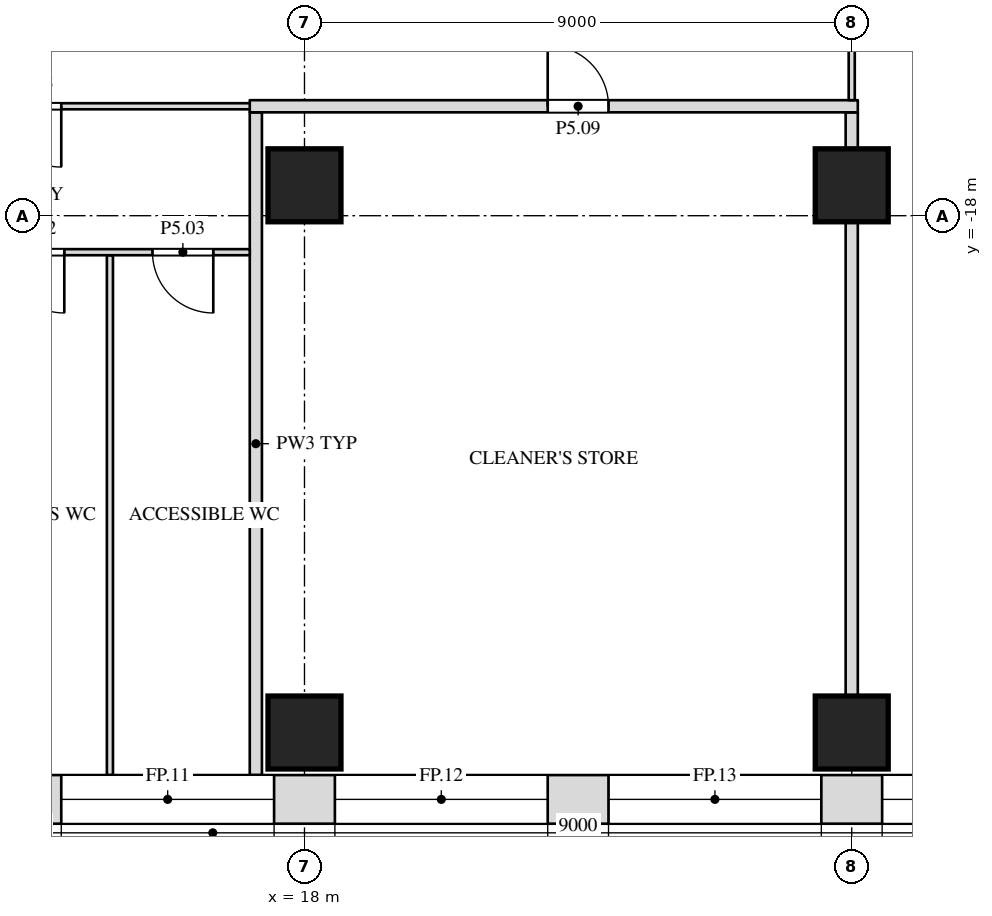
"""IFC4 building model, lengths in metres.
Left out: names, types, materials, properties, quantities, classifications, styles, units other than length and angle.
Written with IfcOpenShell. Run it as: python <this file> out.ifc"""

import sys

from ifc_helpers import new_model, si_unit, direction, frame, frame_2d, origin, origin_2d, place, context, subcontext, project, spatial, rectangle, extrude, element, fill, save


model = new_model("IFC4")
c1 = context("Model", 3, precision=1e-05, world=origin(), true_north=direction((0.0, 1.0)))
c2 = subcontext(c1, "Body", "Model", "MODEL_VIEW")
j1 = project(units=[si_unit("LENGTHUNIT", "METRE"), si_unit("PLANEANGLEUNIT", "RADIAN")], contexts=[c1])
p1 = place(None, origin())
s1 = spatial("IfcSite", under=j1, at=p1, CompositionType="ELEMENT")
p2 = place(p1, origin())
s2 = spatial("IfcBuilding", under=s1, at=p2, CompositionType="ELEMENT")
p3 = place(p2, frame((0.0, 0.0, 33.0)))
s3 = spatial("IfcBuildingStorey", under=s2, at=p3, CompositionType="ELEMENT", Elevation=33.0)
for number, where, z_axis, x_axis in (
    (1, (18.0, -26.5, 0.0), (0.0, 0.0, 1.0), (1.0, 0.0, 0.0)),
    (2, (27.0, -26.5, 0.0), (0.0, 0.0, 1.0), (1.0, 0.0, 0.0)),
    (3, (18.0, -17.5, 0.0), (0.0, 0.0, 1.0), (1.0, 0.0, 0.0)),
    (4, (27.0, -17.5, 0.0), (0.0, 0.0, 1.0), (1.0, 0.0, 0.0)),
):
    element("IfcColumn", number, at=place(p3, frame(where, z_axis=z_axis, x_axis=x_axis)), inside=s3, PredefinedType="COLUMN", context=c2, shape_type="SweptSolid", body=[
        extrude(rectangle(XDim=1.2, YDim=1.2, at=origin_2d()), origin(), (0.0, 0.0, 1.0), 6.0),
    ])
p4 = place(p3, frame((14.8, -27.2, 0.0), z_axis=(0.0, 0.0, 1.0), x_axis=(0.0, 1.0, 0.0)))
e5 = element("IfcWall", 5, at=p4, inside=s3, PredefinedType="PARTITIONING", context=c2, shape_type="SweptSolid", body=[
    extrude(rectangle(XDim=8.55, YDim=0.1, at=frame_2d((4.275, 0.0))), origin(), (0.0, 0.0, 1.0), 5.75),
])
p5 = place(p3, frame((17.2, -27.2, 0.0), z_axis=(0.0, 0.0, 1.0), x_axis=(0.0, 1.0, 0.0)))
e6 = element("IfcWall", 6, at=p5, inside=s3, PredefinedType="PARTITIONING", context=c2, shape_type="SweptSolid", body=[
    extrude(rectangle(XDim=10.9, YDim=0.2, at=frame_2d((5.45, 0.0))), origin(), (0.0, 0.0, 1.0), 5.75),
])
p6 = place(p3, frame((27.0, -25.9, 0.0), z_axis=(0.0, 0.0, 1.0), x_axis=(0.0, 1.0, 0.0)))
e7 = element("IfcWall", 7, at=p6, inside=s3, PredefinedType="PARTITIONING", context=c2, shape_type="SweptSolid", body=[
    extrude(rectangle(XDim=7.8, YDim=0.2, at=frame_2d((3.9, 0.0))), origin(), (0.0, 0.0, 1.0), 5.138),
])
p7 = place(p3, frame((27.0, -16.9, 0.0), z_axis=(0.0, 0.0, 1.0), x_axis=(0.0, 1.0, 0.0)))
e8 = element("IfcWall", 8, at=p7, inside=s3, PredefinedType="PARTITIONING", context=c2, shape_type="SweptSolid", body=[
    extrude(rectangle(XDim=0.6, YDim=0.2, at=frame_2d((0.3, 0.0))), origin(), (0.0, 0.0, 1.0), 5.138),
])
p8 = place(p3, frame((9.85, -18.6, 0.0), z_axis=(0.0, 0.0, 1.0), x_axis=(1.0, 0.0, 0.0)))
e9 = element("IfcWall", 9, at=p8, inside=s3, PredefinedType="PARTITIONING", context=c2, shape_type="SweptSolid", body=[
    extrude(rectangle(XDim=7.25, YDim=0.1, at=frame_2d((3.625, 0.0))), origin(), (0.0, 0.0, 1.0), 5.75),
])
p9 = place(p8, frame((0.7, 0.0, 0.0)))
e10 = element("IfcOpeningElement", 10, at=p9, cuts=e9, PredefinedType="OPENING", context=c2, shape_type="SweptSolid", body=[
    extrude(rectangle(XDim=1.0, YDim=2.1, at=frame_2d((0.5, 1.05))), frame((0.0, 0.062, 0.0), z_axis=(0.0, -1.0, 0.0), x_axis=(1.0, 0.0, 0.0)), (0.0, 0.0, 1.0), 0.124),
])
p10 = place(p8, frame((3.2, 0.0, 0.0)))
e11 = element("IfcOpeningElement", 11, at=p10, cuts=e9, PredefinedType="OPENING", context=c2, shape_type="SweptSolid", body=[
    extrude(rectangle(XDim=1.0, YDim=2.1, at=frame_2d((0.5, 1.05))), frame((0.0, 0.062, 0.0), z_axis=(0.0, -1.0, 0.0), x_axis=(1.0, 0.0, 0.0)), (0.0, 0.0, 1.0), 0.124),
])
p11 = place(p8, frame((5.65, 0.0, 0.0)))
e12 = element("IfcOpeningElement", 12, at=p11, cuts=e9, PredefinedType="OPENING", context=c2, shape_type="SweptSolid", body=[
    extrude(rectangle(XDim=1.0, YDim=2.1, at=frame_2d((0.5, 1.05))), frame((0.0, 0.062, 0.0), z_axis=(0.0, -1.0, 0.0), x_axis=(1.0, 0.0, 0.0)), (0.0, 0.0, 1.0), 0.124),
])
p12 = place(p3, frame((-0.075, -16.2, 0.0), z_axis=(0.0, 0.0, 1.0), x_axis=(1.0, 0.0, 0.0)))
e13 = element("IfcWall", 13, at=p12, inside=s3, PredefinedType="PARTITIONING", context=c2, shape_type="SweptSolid", body=[
    extrude(rectangle(XDim=17.375, YDim=0.1, at=frame_2d((8.688, 0.0))), origin(), (0.0, 0.0, 1.0), 5.75),
])
p13 = place(p12, frame((4.075, 0.0, 0.0)))
e14 = element("IfcOpeningElement", 14, at=p13, cuts=e13, PredefinedType="OPENING", context=c2, shape_type="SweptSolid", body=[
    extrude(rectangle(XDim=1.0, YDim=2.1, at=frame_2d((0.5, 1.05))), frame((0.0, 0.062, 0.0), z_axis=(0.0, -1.0, 0.0), x_axis=(1.0, 0.0, 0.0)), (0.0, 0.0, 1.0), 0.124),
])
p14 = place(p12, frame((13.075, 0.0, 0.0)))
e15 = element("IfcOpeningElement", 15, at=p14, cuts=e13, PredefinedType="OPENING", context=c2, shape_type="SweptSolid", body=[
    extrude(rectangle(XDim=1.0, YDim=2.1, at=frame_2d((0.5, 1.05))), frame((0.0, 0.062, 0.0), z_axis=(0.0, -1.0, 0.0), x_axis=(1.0, 0.0, 0.0)), (0.0, 0.0, 1.0), 0.124),
])
p15 = place(p3, frame((17.1, -16.2, 0.0), z_axis=(0.0, 0.0, 1.0), x_axis=(1.0, 0.0, 0.0)))
e16 = element("IfcWall", 16, at=p15, inside=s3, PredefinedType="PARTITIONING", context=c2, shape_type="SweptSolid", body=[
    extrude(rectangle(XDim=10.0, YDim=0.2, at=frame_2d((5.0, 0.0))), origin(), (0.0, 0.0, 1.0), 5.75),
])
p16 = place(p15, frame((4.9, 0.0, 0.0)))
e17 = element("IfcOpeningElement", 17, at=p16, cuts=e16, PredefinedType="OPENING", context=c2, shape_type="SweptSolid", body=[
    extrude(rectangle(XDim=1.0, YDim=2.1, at=frame_2d((0.5, 1.05))), frame((0.0, 0.112, 0.0), z_axis=(0.0, -1.0, 0.0), x_axis=(1.0, 0.0, 0.0)), (0.0, 0.0, 1.0), 0.224),
])
p17 = place(p3, frame((27.0, -16.1, 0.0), z_axis=(0.0, 0.0, 1.0), x_axis=(0.0, 1.0, 0.0)))
e18 = element("IfcWall", 18, at=p17, inside=s3, PredefinedType="PARTITIONING", context=c2, shape_type="SweptSolid", body=[
    extrude(rectangle(XDim=2.05, YDim=0.1, at=frame_2d((1.025, 0.0))), origin(), (0.0, 0.0, 1.0), 5.138),
])
p18 = place(p3, frame((-32.948, -27.6, 0.0), z_axis=(0.0, 0.0, 1.0), x_axis=(1.0, 0.0, 0.0)))
e19 = element("IfcWall", 19, at=p18, inside=s3, PredefinedType="SOLIDWALL", context=c2, shape_type="SweptSolid", body=[
    extrude(rectangle(XDim=65.895, YDim=0.8, at=frame_2d((32.948, 0.0))), origin(), (0.0, 0.0, 1.0), 5.75),
])
p19 = place(p18, frame((1.948, 0.0, 1.0)))
e20 = element("IfcOpeningElement", 20, at=p19, cuts=e19, PredefinedType="OPENING", context=c2, shape_type="SweptSolid", body=[
    extrude(rectangle(XDim=3.5, YDim=4.0, at=frame_2d((1.75, 2.0))), frame((0.0, 0.412, 0.0), z_axis=(0.0, -1.0, 0.0), x_axis=(1.0, 0.0, 0.0)), (0.0, 0.0, 1.0), 0.824),
])
p20 = place(p18, frame((6.448, 0.0, 1.0)))
e21 = element("IfcOpeningElement", 21, at=p20, cuts=e19, PredefinedType="OPENING", context=c2, shape_type="SweptSolid", body=[
    extrude(rectangle(XDim=3.5, YDim=4.0, at=frame_2d((1.75, 2.0))), frame((0.0, 0.412, 0.0), z_axis=(0.0, -1.0, 0.0), x_axis=(1.0, 0.0, 0.0)), (0.0, 0.0, 1.0), 0.824),
])
p21 = place(p18, frame((10.948, 0.0, 1.0)))
e22 = element("IfcOpeningElement", 22, at=p21, cuts=e19, PredefinedType="OPENING", context=c2, shape_type="SweptSolid", body=[
    extrude(rectangle(XDim=3.5, YDim=4.0, at=frame_2d((1.75, 2.0))), frame((0.0, 0.412, 0.0), z_axis=(0.0, -1.0, 0.0), x_axis=(1.0, 0.0, 0.0)), (0.0, 0.0, 1.0), 0.824),
])
p22 = place(p18, frame((15.448, 0.0, 1.0)))
e23 = element("IfcOpeningElement", 23, at=p22, cuts=e19, PredefinedType="OPENING", context=c2, shape_type="SweptSolid", body=[
    extrude(rectangle(XDim=3.5, YDim=4.0, at=frame_2d((1.75, 2.0))), frame((0.0, 0.412, 0.0), z_axis=(0.0, -1.0, 0.0), x_axis=(1.0, 0.0, 0.0)), (0.0, 0.0, 1.0), 0.824),
])
p23 = place(p18, frame((19.948, 0.0, 1.0)))
e24 = element("IfcOpeningElement", 24, at=p23, cuts=e19, PredefinedType="OPENING", context=c2, shape_type="SweptSolid", body=[
    extrude(rectangle(XDim=3.5, YDim=4.0, at=frame_2d((1.75, 2.0))), frame((0.0, 0.412, 0.0), z_axis=(0.0, -1.0, 0.0), x_axis=(1.0, 0.0, 0.0)), (0.0, 0.0, 1.0), 0.824),
])
p24 = place(p18, frame((24.448, 0.0, 1.0)))
e25 = element("IfcOpeningElement", 25, at=p24, cuts=e19, PredefinedType="OPENING", context=c2, shape_type="SweptSolid", body=[
    extrude(rectangle(XDim=3.5, YDim=4.0, at=frame_2d((1.75, 2.0))), frame((0.0, 0.412, 0.0), z_axis=(0.0, -1.0, 0.0), x_axis=(1.0, 0.0, 0.0)), (0.0, 0.0, 1.0), 0.824),
])
p25 = place(p18, frame((28.948, 0.0, 1.0)))
e26 = element("IfcOpeningElement", 26, at=p25, cuts=e19, PredefinedType="OPENING", context=c2, shape_type="SweptSolid", body=[
    extrude(rectangle(XDim=3.5, YDim=4.0, at=frame_2d((1.75, 2.0))), frame((0.0, 0.412, 0.0), z_axis=(0.0, -1.0, 0.0), x_axis=(1.0, 0.0, 0.0)), (0.0, 0.0, 1.0), 0.824),
])
p26 = place(p18, frame((33.448, 0.0, 1.0)))
e27 = element("IfcOpeningElement", 27, at=p26, cuts=e19, PredefinedType="OPENING", context=c2, shape_type="SweptSolid", body=[
    extrude(rectangle(XDim=3.5, YDim=4.0, at=frame_2d((1.75, 2.0))), frame((0.0, 0.412, 0.0), z_axis=(0.0, -1.0, 0.0), x_axis=(1.0, 0.0, 0.0)), (0.0, 0.0, 1.0), 0.824),
])
p27 = place(p18, frame((37.948, 0.0, 1.0)))
e28 = element("IfcOpeningElement", 28, at=p27, cuts=e19, PredefinedType="OPENING", context=c2, shape_type="SweptSolid", body=[
    extrude(rectangle(XDim=3.5, YDim=4.0, at=frame_2d((1.75, 2.0))), frame((0.0, 0.412, 0.0), z_axis=(0.0, -1.0, 0.0), x_axis=(1.0, 0.0, 0.0)), (0.0, 0.0, 1.0), 0.824),
])
p28 = place(p18, frame((42.448, 0.0, 1.0)))
e29 = element("IfcOpeningElement", 29, at=p28, cuts=e19, PredefinedType="OPENING", context=c2, shape_type="SweptSolid", body=[
    extrude(rectangle(XDim=3.5, YDim=4.0, at=frame_2d((1.75, 2.0))), frame((0.0, 0.412, 0.0), z_axis=(0.0, -1.0, 0.0), x_axis=(1.0, 0.0, 0.0)), (0.0, 0.0, 1.0), 0.824),
])
p29 = place(p18, frame((46.948, 0.0, 1.0)))
e30 = element("IfcOpeningElement", 30, at=p29, cuts=e19, PredefinedType="OPENING", context=c2, shape_type="SweptSolid", body=[
    extrude(rectangle(XDim=3.5, YDim=4.0, at=frame_2d((1.75, 2.0))), frame((0.0, 0.412, 0.0), z_axis=(0.0, -1.0, 0.0), x_axis=(1.0, 0.0, 0.0)), (0.0, 0.0, 1.0), 0.824),
])
p30 = place(p18, frame((51.448, 0.0, 1.0)))
e31 = element("IfcOpeningElement", 31, at=p30, cuts=e19, PredefinedType="OPENING", context=c2, shape_type="SweptSolid", body=[
    extrude(rectangle(XDim=3.5, YDim=4.0, at=frame_2d((1.75, 2.0))), frame((0.0, 0.412, 0.0), z_axis=(0.0, -1.0, 0.0), x_axis=(1.0, 0.0, 0.0)), (0.0, 0.0, 1.0), 0.824),
])
p31 = place(p18, frame((55.948, 0.0, 1.0)))
e32 = element("IfcOpeningElement", 32, at=p31, cuts=e19, PredefinedType="OPENING", context=c2, shape_type="SweptSolid", body=[
    extrude(rectangle(XDim=3.5, YDim=4.0, at=frame_2d((1.75, 2.0))), frame((0.0, 0.412, 0.0), z_axis=(0.0, -1.0, 0.0), x_axis=(1.0, 0.0, 0.0)), (0.0, 0.0, 1.0), 0.824),
])
p32 = place(p18, frame((60.448, 0.0, 1.0)))
e33 = element("IfcOpeningElement", 33, at=p32, cuts=e19, PredefinedType="OPENING", context=c2, shape_type="SweptSolid", body=[
    extrude(rectangle(XDim=3.5, YDim=4.0, at=frame_2d((1.75, 2.0))), frame((0.0, 0.412, 0.0), z_axis=(0.0, -1.0, 0.0), x_axis=(1.0, 0.0, 0.0)), (0.0, 0.0, 1.0), 0.824),
])
p33 = place(p10, origin())
e34 = element("IfcDoor", 34, at=p33, inside=s3, OperationType="SINGLE_SWING_LEFT", PredefinedType="DOOR", context=c2, shape_type="SweptSolid", body=[
    extrude(rectangle(XDim=1.0, YDim=2.1, at=frame_2d((0.5, 1.05))), frame((0.0, 0.025, 0.0), z_axis=(0.0, -1.0, 0.0), x_axis=(1.0, 0.0, 0.0)), (0.0, 0.0, 1.0), 0.05),
])
fill(e11, e34)
p34 = place(p11, origin())
e35 = element("IfcDoor", 35, at=p34, inside=s3, OperationType="SINGLE_SWING_LEFT", PredefinedType="DOOR", context=c2, shape_type="SweptSolid", body=[
    extrude(rectangle(XDim=1.0, YDim=2.1, at=frame_2d((0.5, 1.05))), frame((0.0, 0.025, 0.0), z_axis=(0.0, -1.0, 0.0), x_axis=(1.0, 0.0, 0.0)), (0.0, 0.0, 1.0), 0.05),
])
fill(e12, e35)
p35 = place(p14, origin())
e36 = element("IfcDoor", 36, at=p35, inside=s3, OperationType="SINGLE_SWING_LEFT", PredefinedType="DOOR", context=c2, shape_type="SweptSolid", body=[
    extrude(rectangle(XDim=1.0, YDim=2.1, at=frame_2d((0.5, 1.05))), frame((0.0, 0.025, 0.0), z_axis=(0.0, -1.0, 0.0), x_axis=(1.0, 0.0, 0.0)), (0.0, 0.0, 1.0), 0.05),
])
fill(e15, e36)
p36 = place(p16, origin())
e37 = element("IfcDoor", 37, at=p36, inside=s3, OperationType="SINGLE_SWING_LEFT", PredefinedType="DOOR", context=c2, shape_type="SweptSolid", body=[
    extrude(rectangle(XDim=1.0, YDim=2.1, at=frame_2d((0.5, 1.05))), frame((0.0, 0.025, 0.0), z_axis=(0.0, -1.0, 0.0), x_axis=(1.0, 0.0, 0.0)), (0.0, 0.0, 1.0), 0.05),
])
fill(e17, e37)
p37 = place(p29, origin())
e38 = element("IfcWindow", 38, at=p37, inside=s3, PartitioningType="SINGLE_PANEL", PredefinedType="WINDOW", context=c2, shape_type="SweptSolid", body=[
    extrude(rectangle(XDim=3.5, YDim=4.0, at=frame_2d((1.75, 2.0))), frame((0.0, 0.03, 0.0), z_axis=(0.0, -1.0, 0.0), x_axis=(1.0, 0.0, 0.0)), (0.0, 0.0, 1.0), 0.06),
])
fill(e30, e38)
p38 = place(p30, origin())
e39 = element("IfcWindow", 39, at=p38, inside=s3, PartitioningType="SINGLE_PANEL", PredefinedType="WINDOW", context=c2, shape_type="SweptSolid", body=[
    extrude(rectangle(XDim=3.5, YDim=4.0, at=frame_2d((1.75, 2.0))), frame((0.0, 0.03, 0.0), z_axis=(0.0, -1.0, 0.0), x_axis=(1.0, 0.0, 0.0)), (0.0, 0.0, 1.0), 0.06),
])
fill(e31, e39)
p39 = place(p31, origin())
e40 = element("IfcWindow", 40, at=p39, inside=s3, PartitioningType="SINGLE_PANEL", PredefinedType="WINDOW", context=c2, shape_type="SweptSolid", body=[
    extrude(rectangle(XDim=3.5, YDim=4.0, at=frame_2d((1.75, 2.0))), frame((0.0, 0.03, 0.0), z_axis=(0.0, -1.0, 0.0), x_axis=(1.0, 0.0, 0.0)), (0.0, 0.0, 1.0), 0.06),
])
fill(e32, e40)
p40 = place(p32, origin())
e41 = element("IfcWindow", 41, at=p40, inside=s3, PartitioningType="SINGLE_PANEL", PredefinedType="WINDOW", context=c2, shape_type="SweptSolid", body=[
    extrude(rectangle(XDim=3.5, YDim=4.0, at=frame_2d((1.75, 2.0))), frame((0.0, 0.03, 0.0), z_axis=(0.0, -1.0, 0.0), x_axis=(1.0, 0.0, 0.0)), (0.0, 0.0, 1.0), 0.06),
])
fill(e33, e41)
save(model, sys.argv[1])
